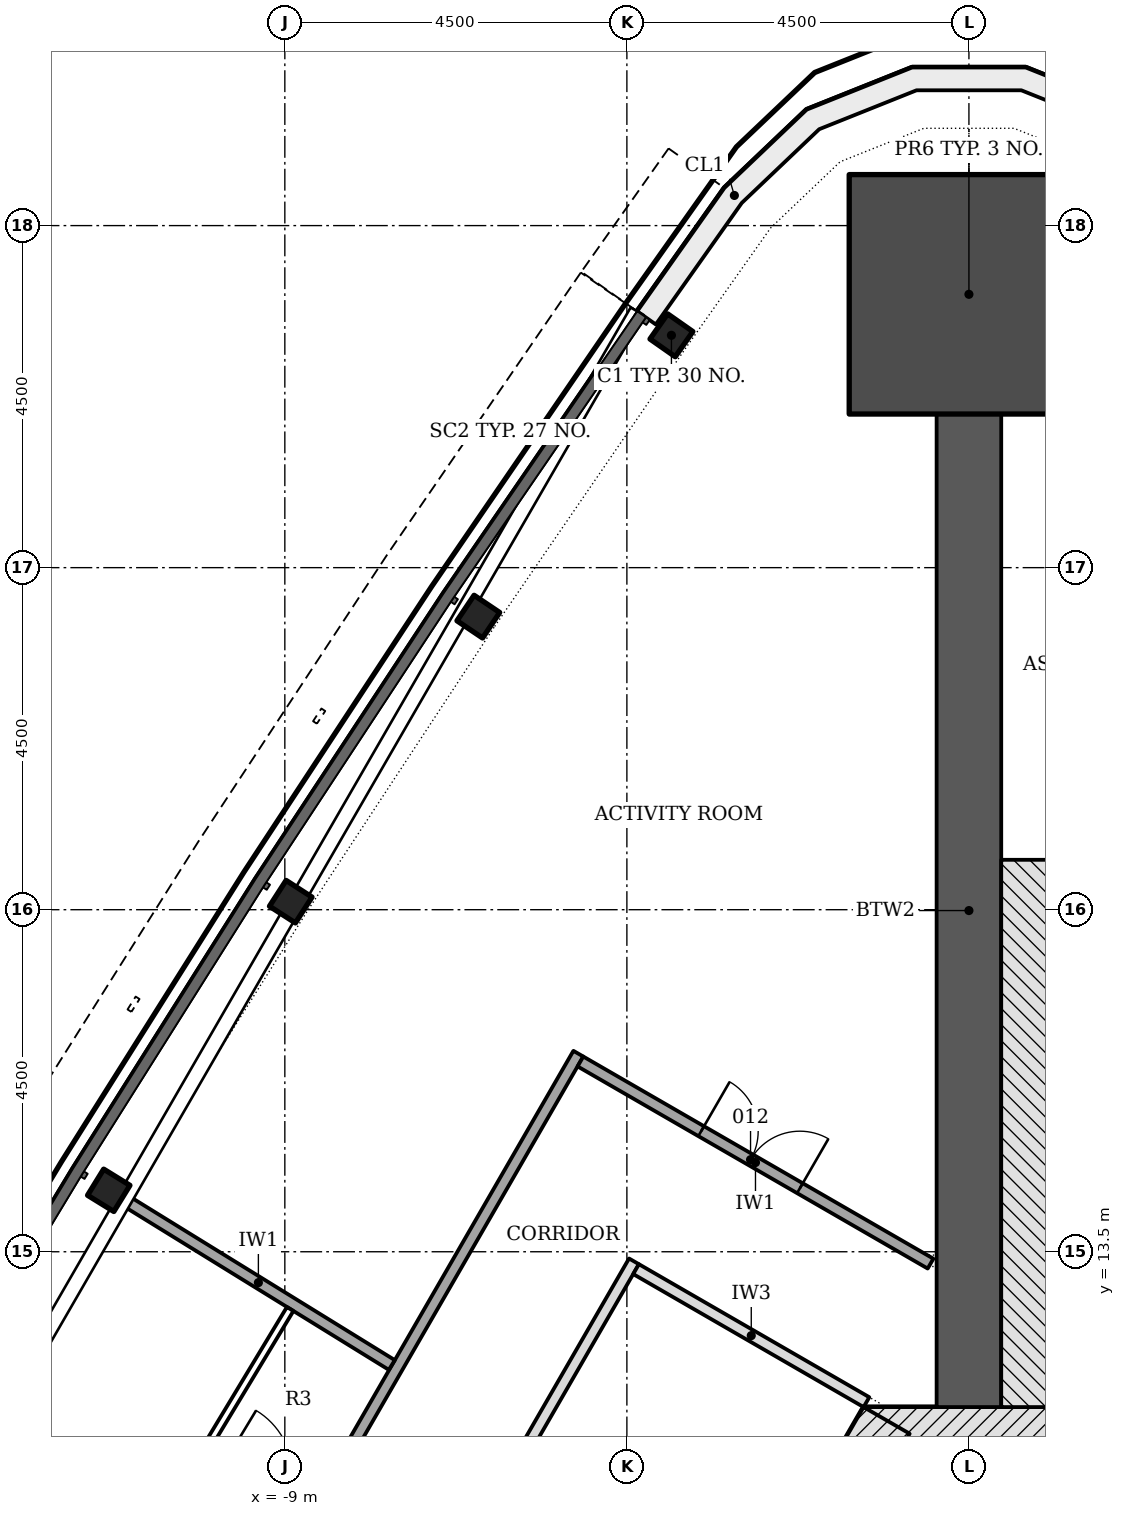
"""IFC4 building model, lengths in metres.
Left out: names, types, materials, properties, quantities, classifications, styles, units other than length and angle.
Written with IfcOpenShell. Run it as: python <this file> out.ifc"""

import sys

from ifc_helpers import new_model, si_unit, direction, frame, frame_2d, origin, origin_2d, place, context, subcontext, project, spatial, polyline, rectangle, i_section, outline, extrude, element, fill, save


model = new_model("IFC4")
c1 = context("Model", 3, precision=1e-05, world=origin(), true_north=direction((0.0, 1.0)))
c2 = subcontext(c1, "Body", "Model", "MODEL_VIEW")
j1 = project(units=[si_unit("LENGTHUNIT", "METRE"), si_unit("PLANEANGLEUNIT", "RADIAN")], contexts=[c1])
p1 = place(None, origin())
s1 = spatial("IfcSite", under=j1, at=p1, CompositionType="ELEMENT")
p2 = place(p1, origin())
s2 = spatial("IfcBuilding", under=s1, at=p2, CompositionType="ELEMENT")
p3 = place(p2, frame((0.0, 0.0, 79.8)))
s3 = spatial("IfcBuildingStorey", under=s2, at=p3, CompositionType="ELEMENT", Elevation=79.8)
p4 = place(p3, frame((10.311, -4.703, -0.2), z_axis=(0.0, 0.0, 1.0), x_axis=(-0.500001446645, 0.866024568562, 0.0)))
e1 = element("IfcWall", 1, at=p4, inside=s3, PredefinedType="SHEAR", context=c2, shape_type="SweptSolid", body=[
    extrude(rectangle(XDim=18.458, YDim=0.7, at=frame_2d((9.229, 0.0))), origin(), (0.0, 0.0, 1.0), 3.6),
])
p5 = place(p4, frame((5.9, 0.0, 0.2)))
e2 = element("IfcOpeningElement", 2, at=p5, cuts=e1, PredefinedType="OPENING", context=c2, shape_type="SweptSolid", body=[
    extrude(rectangle(XDim=1.0, YDim=2.1, at=frame_2d((0.5, 1.05))), frame((0.0, 0.36, 0.0), z_axis=(0.0, -1.0, 0.0), x_axis=(1.0, 0.0, 0.0)), (0.0, 0.0, 1.0), 0.72),
])
p6 = place(p4, frame((1.452, 0.0, 0.2)))
e3 = element("IfcOpeningElement", 3, at=p6, cuts=e1, PredefinedType="OPENING", context=c2, shape_type="SweptSolid", body=[
    extrude(rectangle(XDim=0.9, YDim=2.1, at=frame_2d((0.45, 1.05))), frame((0.0, 0.36, 0.0), z_axis=(0.0, -1.0, 0.0), x_axis=(1.0, 0.0, 0.0)), (0.0, 0.0, 1.0), 0.72),
])
p7 = place(p4, frame((4.396, 0.0, 0.2)))
e4 = element("IfcOpeningElement", 4, at=p7, cuts=e1, PredefinedType="OPENING", context=c2, shape_type="SweptSolid", body=[
    extrude(rectangle(XDim=0.9, YDim=2.1, at=frame_2d((0.45, 1.05))), frame((0.0, 0.36, 0.0), z_axis=(0.0, -1.0, 0.0), x_axis=(1.0, 0.0, 0.0)), (0.0, 0.0, 1.0), 0.72),
])
p8 = place(p4, frame((13.023, 0.0, 0.2)))
e5 = element("IfcOpeningElement", 5, at=p8, cuts=e1, PredefinedType="OPENING", context=c2, shape_type="SweptSolid", body=[
    extrude(rectangle(XDim=0.9, YDim=2.1, at=frame_2d((0.45, 1.05))), frame((0.0, 0.36, 0.0), z_axis=(0.0, -1.0, 0.0), x_axis=(1.0, 0.0, 0.0)), (0.0, 0.0, 1.0), 0.72),
])
p9 = place(p3, frame((1.386, 11.106, -0.2), z_axis=(0.0, 0.0, 1.0), x_axis=(-1.0, 0.0, 0.0)))
e6 = element("IfcWall", 6, at=p9, inside=s3, PredefinedType="SHEAR", context=c2, shape_type="SweptSolid", body=[
    extrude(rectangle(XDim=2.771, YDim=0.7, at=frame_2d((1.386, 0.0))), origin(), (0.0, 0.0, 1.0), 3.6),
])
p10 = place(p3, frame((-1.083, 11.281, -0.2), z_axis=(0.0, 0.0, 1.0), x_axis=(-0.500001446645, -0.866024568562, 0.0)))
e7 = element("IfcWall", 7, at=p10, inside=s3, PredefinedType="SHEAR", context=c2, shape_type="SweptSolid", body=[
    extrude(rectangle(XDim=18.458, YDim=0.7, at=frame_2d((9.229, 0.0))), origin(), (0.0, 0.0, 1.0), 3.6),
])
p11 = place(p10, frame((8.979, 0.0, 0.2)))
e8 = element("IfcOpeningElement", 8, at=p11, cuts=e7, PredefinedType="OPENING", context=c2, shape_type="SweptSolid", body=[
    extrude(rectangle(XDim=1.2, YDim=2.1, at=frame_2d((0.6, 1.05))), frame((0.0, 0.36, 0.0), z_axis=(0.0, -1.0, 0.0), x_axis=(1.0, 0.0, 0.0)), (0.0, 0.0, 1.0), 0.72),
])
p12 = place(p10, frame((11.029, 0.0, 0.2)))
e9 = element("IfcOpeningElement", 9, at=p12, cuts=e7, PredefinedType="OPENING", context=c2, shape_type="SweptSolid", body=[
    extrude(rectangle(XDim=1.2, YDim=2.1, at=frame_2d((0.6, 1.05))), frame((0.0, 0.36, 0.0), z_axis=(0.0, -1.0, 0.0), x_axis=(1.0, 0.0, 0.0)), (0.0, 0.0, 1.0), 0.72),
])
p13 = place(p3, frame((0.0, 11.456, -0.2), z_axis=(0.0, 0.0, 1.0), x_axis=(0.0, 1.0, 0.0)))
e10 = element("IfcWall", 10, at=p13, inside=s3, PredefinedType="SHEAR", context=c2, shape_type="SweptSolid", body=[
    extrude(rectangle(XDim=13.065, YDim=0.85, at=frame_2d((6.532, 0.0))), origin(), (0.0, 0.0, 1.0), 3.6),
])
p14 = place(p3, frame((0.0, 26.096, -0.2), z_axis=(0.0, 0.0, 1.0), x_axis=(0.0, 1.0, 0.0)))
e11 = element("IfcColumn", 11, at=p14, inside=s3, PredefinedType="COLUMN", context=c2, shape_type="SweptSolid", body=[
    extrude(rectangle(XDim=3.15, YDim=3.15, at=origin_2d()), origin(), (0.0, 0.0, 1.0), 3.6),
])
for number, where, z_axis, x_axis in (
    (12, (-3.914, 25.557, -0.2), (0.0, 0.0, 1.0), (-0.574, -0.819, 0.0)),
    (13, (-6.454, 21.855, -0.2), (0.0, 0.0, 1.0), (-0.558, -0.83, 0.0)),
    (14, (-8.922, 18.105, -0.2), (0.0, 0.0, 1.0), (-0.542, -0.841, 0.0)),
    (15, (-11.316, 14.308, -0.2), (0.0, 0.0, 1.0), (-0.525, -0.851, 0.0)),
):
    element("IfcColumn", number, at=place(p3, frame(where, z_axis=z_axis, x_axis=x_axis)), inside=s3, PredefinedType="COLUMN", context=c2, shape_type="SweptSolid", body=[
        extrude(i_section(OverallWidth=0.404, OverallDepth=0.406, WebThickness=0.027, FlangeThickness=0.044, FilletRadius=0.015, at=origin_2d()), origin(), (0.0, 0.0, 1.0), 3.6),
    ])
p15 = place(p3, origin())
e16 = element("IfcWall", 16, at=p15, inside=s3, PredefinedType="NOTDEFINED", context=c2, shape_type="SweptSolid", body=[
    extrude(outline(polyline([(4.364, 25.873), (3.217, 27.495), (2.135, 28.525), (0.747, 29.08), (-0.747, 29.08), (-2.135, 28.525), (-3.217, 27.495), (-4.364, 25.873), (-4.119, 25.699), (-2.989, 27.298), (-1.969, 28.268), (-0.689, 28.78), (0.689, 28.78), (1.969, 28.268), (2.989, 27.298), (4.119, 25.699), (4.364, 25.873)])), origin(), (0.0, 0.0, 1.0), 3.3),
])
p16 = place(p3, frame((1.005, 11.456, -0.2), z_axis=(0.0, 0.0, 1.0), x_axis=(0.0, 1.0, 0.0)))
e17 = element("IfcWall", 17, at=p16, inside=s3, PredefinedType="SHEAR", context=c2, shape_type="SweptSolid", body=[
    extrude(rectangle(XDim=7.2, YDim=1.161, at=frame_2d((3.6, 0.0))), origin(), (0.0, 0.0, 1.0), 3.6),
])
p17 = place(p3, frame((-16.256, -3.149, 0.0), z_axis=(0.0, 0.0, 1.0), x_axis=(0.499999683919, 0.866025586274, 0.0)))
e18 = element("IfcWall", 18, at=p17, inside=s3, PredefinedType="PARTITIONING", context=c2, shape_type="SweptSolid", body=[
    extrude(rectangle(XDim=22.234, YDim=0.15, at=frame_2d((11.117, 0.0))), origin(), (0.0, 0.0, 1.0), 2.778),
])
p18 = place(p17, frame((13.553, 0.0, 0.0)))
e19 = element("IfcOpeningElement", 19, at=p18, cuts=e18, PredefinedType="OPENING", context=c2, shape_type="SweptSolid", body=[
    extrude(rectangle(XDim=1.0, YDim=2.1, at=frame_2d((0.5, 1.05))), frame((0.0, 0.085, 0.0), z_axis=(0.0, -1.0, 0.0), x_axis=(1.0, 0.0, 0.0)), (0.0, 0.0, 1.0), 0.17),
])
p19 = place(p17, frame((11.56, 0.0, 0.0)))
e20 = element("IfcOpeningElement", 20, at=p19, cuts=e18, PredefinedType="OPENING", context=c2, shape_type="SweptSolid", body=[
    extrude(rectangle(XDim=1.0, YDim=2.1, at=frame_2d((0.5, 1.05))), frame((0.0, 0.085, 0.0), z_axis=(0.0, -1.0, 0.0), x_axis=(1.0, 0.0, 0.0)), (0.0, 0.0, 1.0), 0.17),
])
p20 = place(p17, frame((3.446, 0.0, 0.0)))
e21 = element("IfcOpeningElement", 21, at=p20, cuts=e18, PredefinedType="OPENING", context=c2, shape_type="SweptSolid", body=[
    extrude(rectangle(XDim=1.5, YDim=2.1, at=frame_2d((0.75, 1.05))), frame((0.0, 0.085, 0.0), z_axis=(0.0, -1.0, 0.0), x_axis=(1.0, 0.0, 0.0)), (0.0, 0.0, 1.0), 0.17),
])
p21 = place(p3, frame((-4.407, 13.374, 0.0), z_axis=(0.0, 0.0, 1.0), x_axis=(-0.499997181693, -0.866027030928, 0.0)))
e22 = element("IfcWall", 22, at=p21, inside=s3, PredefinedType="PARTITIONING", context=c2, shape_type="SweptSolid", body=[
    extrude(rectangle(XDim=16.77, YDim=0.15, at=frame_2d((8.385, 0.0))), origin(), (0.0, 0.0, 1.0), 2.778),
])
p22 = place(p21, frame((8.879, 0.0, 0.0)))
e23 = element("IfcOpeningElement", 23, at=p22, cuts=e22, PredefinedType="OPENING", context=c2, shape_type="SweptSolid", body=[
    extrude(rectangle(XDim=1.0, YDim=2.1, at=frame_2d((0.5, 1.05))), frame((0.0, 0.085, 0.0), z_axis=(0.0, -1.0, 0.0), x_axis=(1.0, 0.0, 0.0)), (0.0, 0.0, 1.0), 0.17),
])
p23 = place(p3, frame((-5.111, 16.003, 0.0), z_axis=(0.0, 0.0, 1.0), x_axis=(0.866034245675, -0.499984685083, 0.0)))
e24 = element("IfcWall", 24, at=p23, inside=s3, PredefinedType="PARTITIONING", context=c2, shape_type="SweptSolid", body=[
    extrude(rectangle(XDim=5.319, YDim=0.15, at=frame_2d((2.66, 0.0))), origin(), (0.0, 0.0, 1.0), 3.4),
])
p24 = place(p23, frame((1.834, 0.0, 0.0)))
e25 = element("IfcOpeningElement", 25, at=p24, cuts=e24, PredefinedType="OPENING", context=c2, shape_type="SweptSolid", body=[
    extrude(rectangle(XDim=1.5, YDim=2.1, at=frame_2d((0.75, 1.05))), frame((0.0, 0.085, 0.0), z_axis=(0.0, -1.0, 0.0), x_axis=(1.0, 0.0, 0.0)), (0.0, 0.0, 1.0), 0.17),
])
p25 = place(p3, frame((-4.379, 13.271, 0.0), z_axis=(0.0, 0.0, 1.0), x_axis=(0.866019471182, -0.500010275428, 0.0)))
e26 = element("IfcWall", 26, at=p25, inside=s3, PredefinedType="PARTITIONING", context=c2, shape_type="SweptSolid", body=[
    extrude(rectangle(XDim=3.5, YDim=0.15, at=frame_2d((1.75, 0.0))), origin(), (0.0, 0.0, 1.0), 3.4),
])
p26 = place(p3, frame((-11.104, 14.177, 0.0), z_axis=(0.0, 0.0, 1.0), x_axis=(0.851052327985, -0.525080884276, 0.0)))
e27 = element("IfcWall", 27, at=p26, inside=s3, PredefinedType="PARTITIONING", context=c2, shape_type="SweptSolid", body=[
    extrude(rectangle(XDim=4.126, YDim=0.15, at=frame_2d((2.063, 0.0))), origin(), (0.0, 0.0, 1.0), 2.778),
])
p27 = place(p3, frame((-8.93, 12.747, 0.0), z_axis=(0.0, 0.0, 1.0), x_axis=(-0.516762446906, -0.856128829948, 0.0)))
e28 = element("IfcWall", 28, at=p27, inside=s3, PredefinedType="PARTITIONING", context=c2, shape_type="SweptSolid", body=[
    extrude(rectangle(XDim=2.374, YDim=0.1, at=frame_2d((1.187, 0.0))), origin(), (0.0, 0.0, 1.0), 2.778),
])
p28 = place(p24, origin())
e29 = element("IfcDoor", 29, at=p28, inside=s3, OperationType="DOUBLE_DOOR_SINGLE_SWING", PredefinedType="DOOR", context=c2, shape_type="SweptSolid", body=[
    extrude(rectangle(XDim=1.5, YDim=2.1, at=frame_2d((0.75, 1.05))), frame((0.0, 0.025, 0.0), z_axis=(0.0, -1.0, 0.0), x_axis=(1.0, 0.0, 0.0)), (0.0, 0.0, 1.0), 0.05),
])
fill(e25, e29)
save(model, sys.argv[1])
